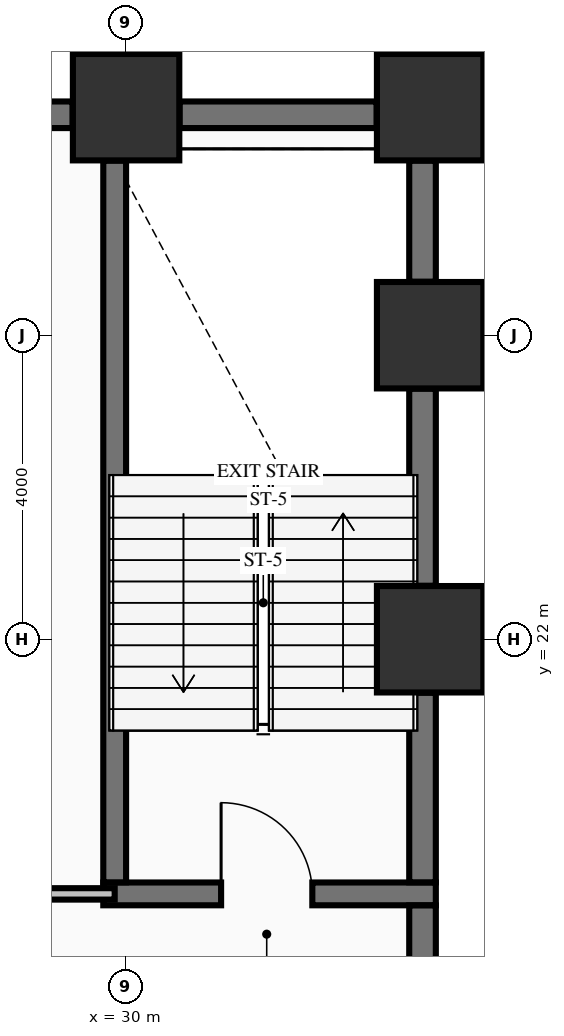
"""IFC4 building model, lengths in metres.
Left out: names, types, materials, properties, quantities, classifications, styles, units other than length and angle.
Written with IfcOpenShell. Run it as: python <this file> out.ifc"""

import sys

from ifc_helpers import new_model, si_unit, direction, frame, frame_2d, origin, origin_2d, place, context, subcontext, project, spatial, rectangle, extrude, element, fill, save


model = new_model("IFC4")
c1 = context("Model", 3, precision=1e-05, world=origin(), true_north=direction((0.0, 1.0)))
c2 = subcontext(c1, "Body", "Model", "MODEL_VIEW")
j1 = project(units=[si_unit("LENGTHUNIT", "METRE"), si_unit("PLANEANGLEUNIT", "RADIAN")], contexts=[c1])
p1 = place(None, origin())
s1 = spatial("IfcSite", under=j1, at=p1, CompositionType="ELEMENT")
p2 = place(p1, origin())
s2 = spatial("IfcBuilding", under=s1, at=p2, CompositionType="ELEMENT")
p3 = place(p2, frame((0.0, 0.0, -4.55)))
s3 = spatial("IfcBuildingStorey", under=s2, at=p3, CompositionType="ELEMENT", Elevation=-4.55)
for number, where, z_axis, x_axis in (
    (1, (30.0, 29.0, 0.0), (0.0, 0.0, 1.0), (1.0, 0.0, 0.0)),
    (2, (34.0, 22.0, 0.0), (0.0, 0.0, 1.0), (1.0, 0.0, 0.0)),
    (3, (34.0, 26.0, 0.0), (0.0, 0.0, 1.0), (1.0, 0.0, 0.0)),
    (4, (34.0, 29.0, 0.0), (0.0, 0.0, 1.0), (1.0, 0.0, 0.0)),
):
    element("IfcColumn", number, at=place(p3, frame(where, z_axis=z_axis, x_axis=x_axis)), inside=s3, PredefinedType="COLUMN", context=c2, shape_type="SweptSolid", body=[
        extrude(rectangle(XDim=1.4, YDim=1.4, at=origin_2d()), origin(), (0.0, 0.0, 1.0), 4.2),
    ])
p4 = place(p3, frame((29.7, 18.65, 0.0), z_axis=(0.0, 0.0, 1.0), x_axis=(1.0, 0.0, 0.0)))
e5 = element("IfcWall", 5, at=p4, inside=s3, PredefinedType="SHEAR", context=c2, shape_type="SweptSolid", body=[
    extrude(rectangle(XDim=4.375, YDim=0.3, at=frame_2d((2.188, 0.0))), origin(), (0.0, 0.0, 1.0), 4.2),
])
p5 = place(p4, frame((1.55, 0.0, 0.0)))
e6 = element("IfcOpeningElement", 6, at=p5, cuts=e5, PredefinedType="OPENING", context=c2, shape_type="SweptSolid", body=[
    extrude(rectangle(XDim=1.2, YDim=2.15, at=frame_2d((0.6, 1.075))), frame((0.0, 0.16, 0.0), z_axis=(0.0, -1.0, 0.0), x_axis=(1.0, 0.0, 0.0)), (0.0, 0.0, 1.0), 0.32),
])
for number, where, z_axis, x_axis in (
    (7, (26.704, 28.9, 0.0), (0.0, 0.0, 1.0), (1.0, 0.0, 0.0)),
    (8, (30.704, 28.9, 0.0), (0.0, 0.0, 1.0), (1.0, 0.0, 0.0)),
):
    element("IfcWall", number, at=place(p3, frame(where, z_axis=z_axis, x_axis=x_axis)), inside=s3, PredefinedType="SHEAR", context=c2, shape_type="SweptSolid", body=[
        extrude(rectangle(XDim=2.592, YDim=0.35, at=frame_2d((1.296, 0.0))), origin(), (0.0, 0.0, 1.0), 4.2),
    ])
p6 = place(p3, frame((19.925, 18.65, 0.0), z_axis=(0.0, 0.0, 1.0), x_axis=(1.0, 0.0, 0.0)))
e9 = element("IfcWall", 9, at=p6, inside=s3, PredefinedType="PARTITIONING", context=c2, shape_type="SweptSolid", body=[
    extrude(rectangle(XDim=9.925, YDim=0.15, at=frame_2d((4.962, 0.0))), origin(), (0.0, 0.0, 1.0), 4.2),
])
p7 = place(p3, frame((29.85, 18.802, 0.0), z_axis=(0.0, 0.0, 1.0), x_axis=(0.0, 1.0, 0.0)))
e10 = element("IfcWall", 10, at=p7, inside=s3, PredefinedType="SHEAR", context=c2, shape_type="SweptSolid", body=[
    extrude(rectangle(XDim=9.494, YDim=0.3, at=frame_2d((4.747, 0.0))), origin(), (0.0, 0.0, 1.0), 4.2),
])
p8 = place(p3, frame((33.9, 16.704, 0.0), z_axis=(0.0, 0.0, 1.0), x_axis=(0.0, 1.0, 0.0)))
e11 = element("IfcWall", 11, at=p8, inside=s3, PredefinedType="SHEAR", context=c2, shape_type="SweptSolid", body=[
    extrude(rectangle(XDim=1.794, YDim=0.35, at=frame_2d((0.897, 0.0))), origin(), (0.0, 0.0, 1.0), 4.2),
])
p9 = place(p3, frame((33.9, 18.802, 0.0), z_axis=(0.0, 0.0, 1.0), x_axis=(0.0, 1.0, 0.0)))
e12 = element("IfcWall", 12, at=p9, inside=s3, PredefinedType="SHEAR", context=c2, shape_type="SweptSolid", body=[
    extrude(rectangle(XDim=2.494, YDim=0.35, at=frame_2d((1.247, 0.0))), origin(), (0.0, 0.0, 1.0), 4.2),
])
p10 = place(p3, frame((33.9, 22.704, 0.0), z_axis=(0.0, 0.0, 1.0), x_axis=(0.0, 1.0, 0.0)))
e13 = element("IfcWall", 13, at=p10, inside=s3, PredefinedType="SHEAR", context=c2, shape_type="SweptSolid", body=[
    extrude(rectangle(XDim=2.592, YDim=0.35, at=frame_2d((1.296, 0.0))), origin(), (0.0, 0.0, 1.0), 4.2),
])
p11 = place(p3, frame((33.9, 26.704, 0.0), z_axis=(0.0, 0.0, 1.0), x_axis=(0.0, 1.0, 0.0)))
e14 = element("IfcWall", 14, at=p11, inside=s3, PredefinedType="SHEAR", context=c2, shape_type="SweptSolid", body=[
    extrude(rectangle(XDim=1.592, YDim=0.35, at=frame_2d((0.796, 0.0))), origin(), (0.0, 0.0, 1.0), 4.2),
])
p12 = place(p5, origin())
e15 = element("IfcDoor", 15, at=p12, inside=s3, OperationType="SINGLE_SWING_LEFT", PredefinedType="DOOR", context=c2, shape_type="SweptSolid", body=[
    extrude(rectangle(XDim=1.2, YDim=2.15, at=frame_2d((0.6, 1.075))), frame((0.0, 0.025, 0.0), z_axis=(0.0, -1.0, 0.0), x_axis=(1.0, 0.0, 0.0)), (0.0, 0.0, 1.0), 0.05),
])
fill(e6, e15)
save(model, sys.argv[1])
